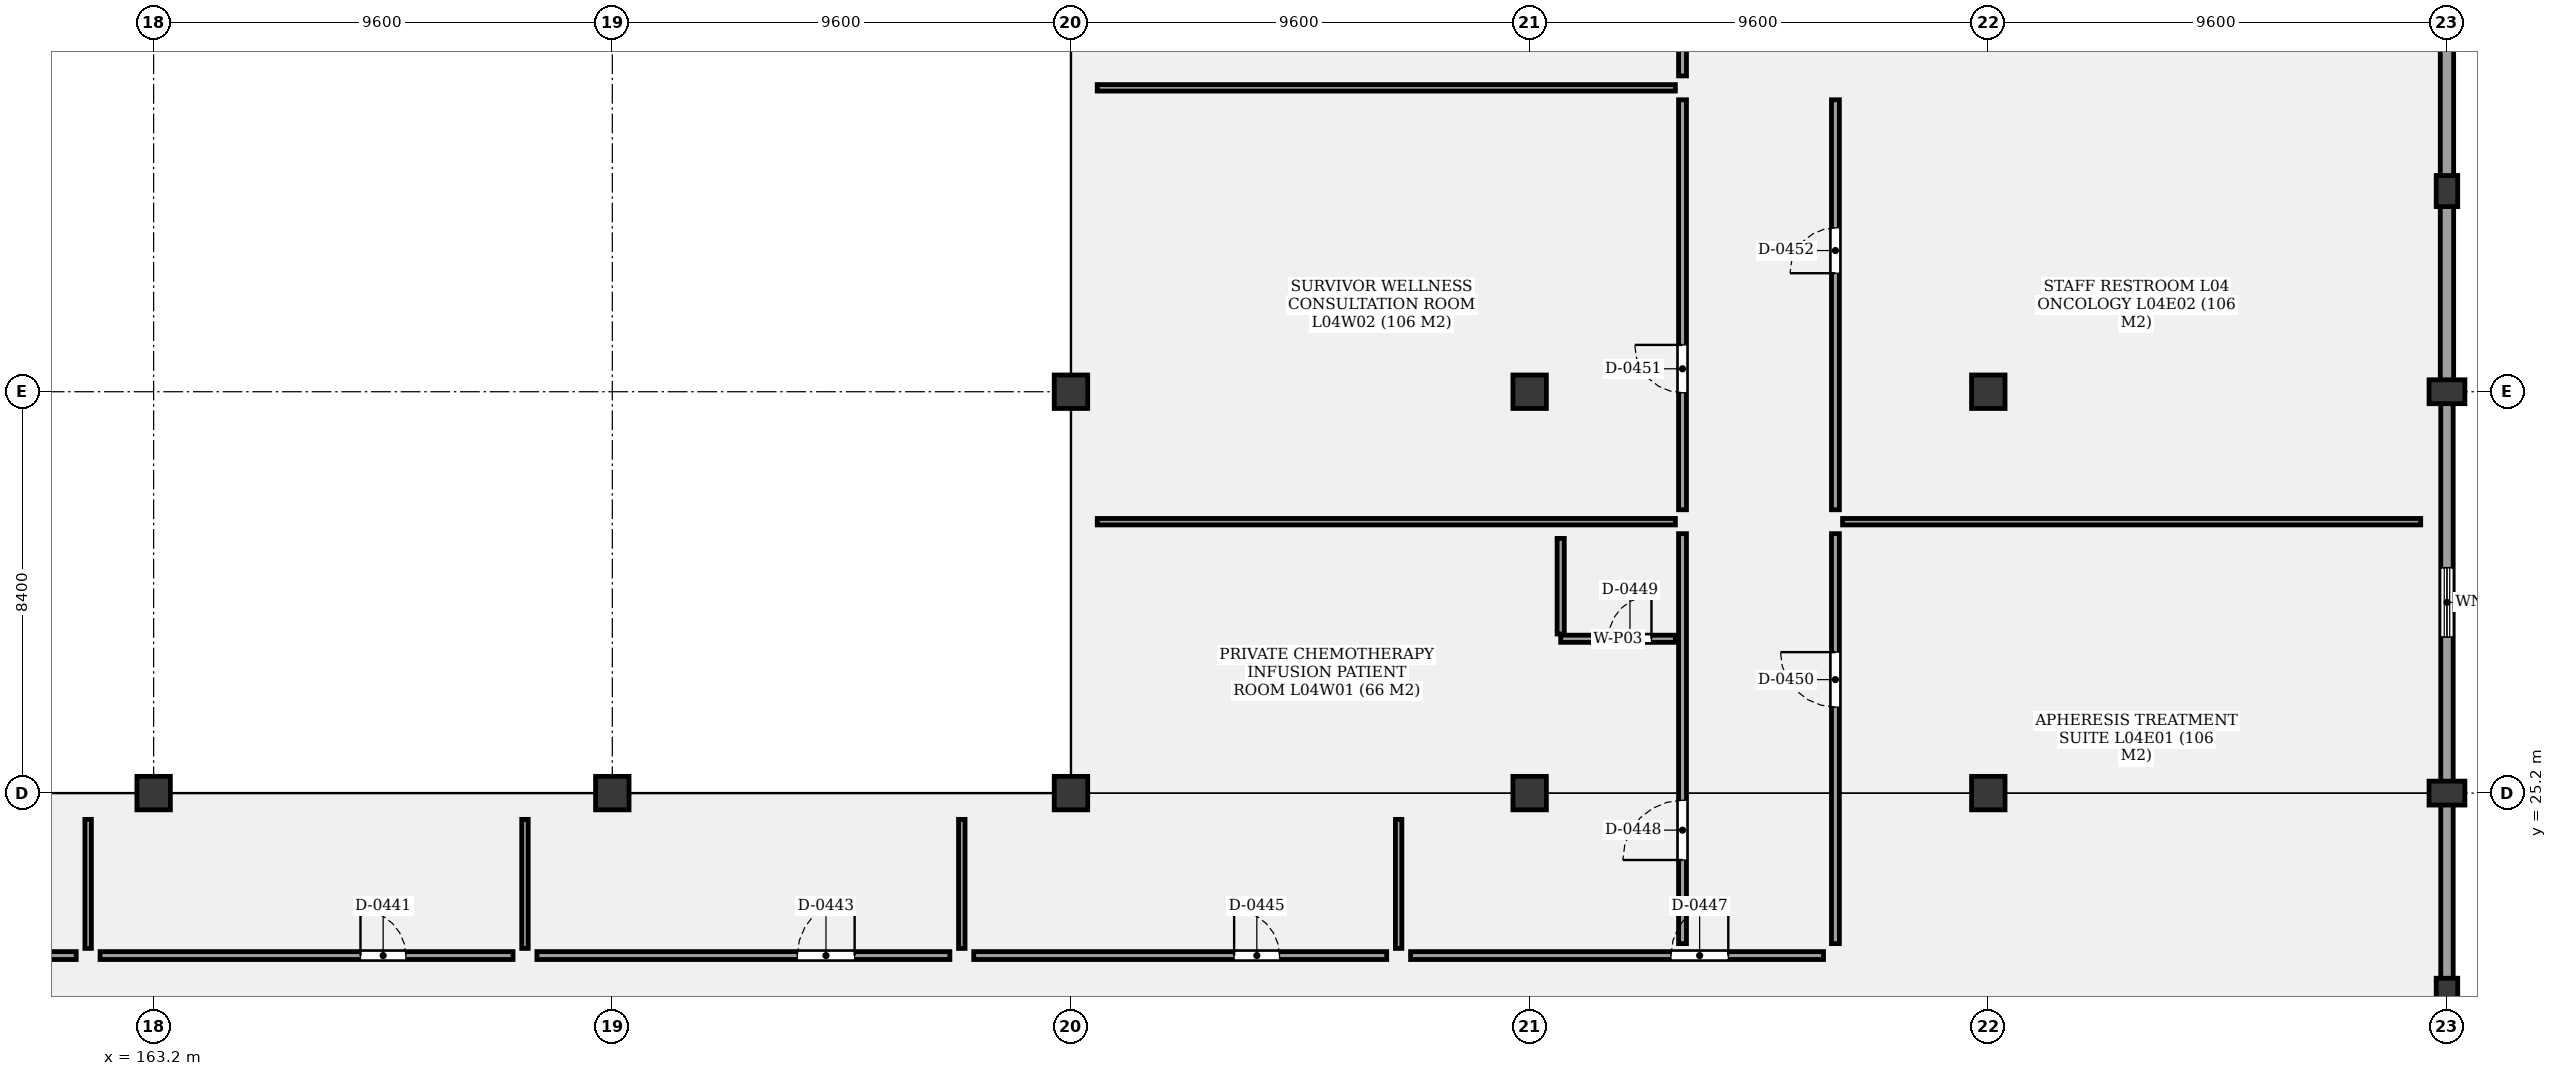
"""IFC4 building model, lengths in metres.
Left out: names, types, materials, properties, quantities, classifications, styles, units other than length and angle.
Written with IfcOpenShell. Run it as: python <this file> out.ifc"""

import sys

from ifc_helpers import new_model, si_unit, direction, frame, frame_2d, origin, origin_2d, place, context, subcontext, project, spatial, rectangle, extrude, element, fill, save


model = new_model("IFC4")
c1 = context("Model", 3, precision=1e-05, world=origin(), true_north=direction((0.0, 1.0)))
c2 = subcontext(c1, "Body", "Model", "MODEL_VIEW")
j1 = project(units=[si_unit("LENGTHUNIT", "METRE"), si_unit("PLANEANGLEUNIT", "RADIAN")], contexts=[c1])
p1 = place(None, origin())
s1 = spatial("IfcSite", under=j1, at=p1, CompositionType="ELEMENT")
p2 = place(p1, origin())
s2 = spatial("IfcBuilding", under=s1, at=p2, CompositionType="ELEMENT")
p3 = place(p2, frame((0.0, 0.0, 17.8)))
s3 = spatial("IfcBuildingStorey", under=s2, at=p3, CompositionType="ELEMENT", Elevation=17.8)
for number, where, z_axis, x_axis in (
    (1, (163.2, 25.2, 0.0), (0.0, 0.0, 1.0), (1.0, 0.0, 0.0)),
    (2, (172.8, 25.2, 0.0), (0.0, 0.0, 1.0), (1.0, 0.0, 0.0)),
    (3, (182.4, 25.2, 0.0), (0.0, 0.0, 1.0), (1.0, 0.0, 0.0)),
    (4, (182.4, 33.6, 0.0), (0.0, 0.0, 1.0), (1.0, 0.0, 0.0)),
    (5, (192.0, 25.2, 0.0), (0.0, 0.0, 1.0), (1.0, 0.0, 0.0)),
    (6, (192.0, 33.6, 0.0), (0.0, 0.0, 1.0), (1.0, 0.0, 0.0)),
    (7, (201.6, 25.2, 0.0), (0.0, 0.0, 1.0), (1.0, 0.0, 0.0)),
    (8, (201.6, 33.6, 0.0), (0.0, 0.0, 1.0), (1.0, 0.0, 0.0)),
):
    element("IfcColumn", number, at=place(p3, frame(where, z_axis=z_axis, x_axis=x_axis)), inside=s3, PredefinedType="COLUMN", context=c2, shape_type="SweptSolid", body=[
        extrude(rectangle(XDim=0.7, YDim=0.7, at=origin_2d()), origin(), (0.0, 0.0, 1.0), 4.2),
    ])
for number, where, z_axis, x_axis in (
    (9, (211.2, 25.2, 0.0), (0.0, 0.0, 1.0), (1.0, 0.0, 0.0)),
    (10, (211.2, 33.6, 0.0), (0.0, 0.0, 1.0), (1.0, 0.0, 0.0)),
):
    element("IfcColumn", number, at=place(p3, frame(where, z_axis=z_axis, x_axis=x_axis)), inside=s3, PredefinedType="COLUMN", context=c2, shape_type="SweptSolid", body=[
        extrude(rectangle(XDim=0.75, YDim=0.5, at=origin_2d()), origin(), (0.0, 0.0, 1.0), 4.2),
    ])
for number, where, z_axis, x_axis in (
    (11, (211.2, 21.0, 0.0), (0.0, 0.0, 1.0), (1.0, 0.0, 0.0)),
    (12, (211.2, 37.8, 0.0), (0.0, 0.0, 1.0), (1.0, 0.0, 0.0)),
):
    element("IfcColumn", number, at=place(p3, frame(where, z_axis=z_axis, x_axis=x_axis)), inside=s3, PredefinedType="PILASTER", context=c2, shape_type="SweptSolid", body=[
        extrude(rectangle(XDim=0.45, YDim=0.65, at=origin_2d()), origin(), (0.0, 0.0, 1.0), 4.2),
    ])
p4 = place(p3, frame((211.2, 33.6, 0.0), z_axis=(0.0, 0.0, 1.0), x_axis=(0.0, -1.0, 0.0)))
e13 = element("IfcWall", 13, at=p4, inside=s3, PredefinedType="SOLIDWALL", context=c2, shape_type="SweptSolid", body=[
    extrude(rectangle(XDim=16.8, YDim=0.26, at=frame_2d((8.4, 0.0))), origin(), (0.0, 0.0, 1.0), 3.39),
])
p5 = place(p4, frame((3.684, 0.0, 0.85)))
e14 = element("IfcOpeningElement", 14, at=p5, cuts=e13, PredefinedType="OPENING", context=c2, shape_type="SweptSolid", body=[
    extrude(rectangle(XDim=1.45, YDim=1.6, at=frame_2d((0.725, 0.8))), frame((0.0, 0.14, 0.0), z_axis=(0.0, -1.0, 0.0), x_axis=(1.0, 0.0, 0.0)), (0.0, 0.0, 1.0), 0.28),
])
p6 = place(p3, frame((211.2, 67.04, 0.0), z_axis=(0.0, 0.0, 1.0), x_axis=(0.0, -1.0, 0.0)))
e15 = element("IfcWall", 15, at=p6, inside=s3, PredefinedType="SOLIDWALL", context=c2, shape_type="SweptSolid", body=[
    extrude(rectangle(XDim=33.44, YDim=0.28, at=frame_2d((16.72, 0.0))), origin(), (0.0, 0.0, 1.0), 3.39),
])
p7 = place(p6, frame((10.189, 0.0, 0.85)))
e16 = element("IfcOpeningElement", 16, at=p7, cuts=e15, PredefinedType="OPENING", context=c2, shape_type="SweptSolid", body=[
    extrude(rectangle(XDim=1.6, YDim=1.6, at=frame_2d((0.8, 0.8))), frame((0.0, 0.15, 0.0), z_axis=(0.0, -1.0, 0.0), x_axis=(1.0, 0.0, 0.0)), (0.0, 0.0, 1.0), 0.3),
])
p8 = place(p3, frame((152.936, 21.8, 0.0), z_axis=(0.0, 0.0, 1.0), x_axis=(1.0, 0.0, 0.0)))
e17 = element("IfcWall", 17, at=p8, inside=s3, PredefinedType="PARTITIONING", context=c2, shape_type="SweptSolid", body=[
    extrude(rectangle(XDim=8.643, YDim=0.165, at=frame_2d((4.322, 0.0))), origin(), (0.0, 0.0, 1.0), 3.3),
])
p9 = place(p8, frame((4.75, 0.0, 0.0)))
e18 = element("IfcOpeningElement", 18, at=p9, cuts=e17, PredefinedType="OPENING", context=c2, shape_type="SweptSolid", body=[
    extrude(rectangle(XDim=1.2, YDim=2.4, at=frame_2d((0.6, 1.2))), frame((0.0, 0.093, 0.0), z_axis=(0.0, -1.0, 0.0), x_axis=(1.0, 0.0, 0.0)), (0.0, 0.0, 1.0), 0.185),
])
p10 = place(p3, frame((162.079, 21.8, 0.0), z_axis=(0.0, 0.0, 1.0), x_axis=(1.0, 0.0, 0.0)))
e19 = element("IfcWall", 19, at=p10, inside=s3, PredefinedType="PARTITIONING", context=c2, shape_type="SweptSolid", body=[
    extrude(rectangle(XDim=8.643, YDim=0.165, at=frame_2d((4.321, 0.0))), origin(), (0.0, 0.0, 1.0), 3.3),
])
p11 = place(p10, frame((5.45, 0.0, 0.0)))
e20 = element("IfcOpeningElement", 20, at=p11, cuts=e19, PredefinedType="OPENING", context=c2, shape_type="SweptSolid", body=[
    extrude(rectangle(XDim=0.95, YDim=2.1, at=frame_2d((0.475, 1.05))), frame((0.0, 0.093, 0.0), z_axis=(0.0, -1.0, 0.0), x_axis=(1.0, 0.0, 0.0)), (0.0, 0.0, 1.0), 0.185),
])
p12 = place(p3, frame((161.829, 21.95, 0.0), z_axis=(0.0, 0.0, 1.0), x_axis=(0.0, 1.0, 0.0)))
e21 = element("IfcWall", 21, at=p12, inside=s3, PredefinedType="PARTITIONING", context=c2, shape_type="SweptSolid", body=[
    extrude(rectangle(XDim=2.7, YDim=0.135, at=frame_2d((1.35, 0.0))), origin(), (0.0, 0.0, 1.0), 3.3),
])
p13 = place(p3, frame((171.222, 21.8, 0.0), z_axis=(0.0, 0.0, 1.0), x_axis=(1.0, 0.0, 0.0)))
e22 = element("IfcWall", 22, at=p13, inside=s3, PredefinedType="PARTITIONING", context=c2, shape_type="SweptSolid", body=[
    extrude(rectangle(XDim=8.643, YDim=0.165, at=frame_2d((4.322, 0.0))), origin(), (0.0, 0.0, 1.0), 3.3),
])
p14 = place(p13, frame((5.45, 0.0, 0.0)))
e23 = element("IfcOpeningElement", 23, at=p14, cuts=e22, PredefinedType="OPENING", context=c2, shape_type="SweptSolid", body=[
    extrude(rectangle(XDim=1.2, YDim=2.4, at=frame_2d((0.6, 1.2))), frame((0.0, 0.093, 0.0), z_axis=(0.0, -1.0, 0.0), x_axis=(1.0, 0.0, 0.0)), (0.0, 0.0, 1.0), 0.185),
])
p15 = place(p3, frame((170.972, 21.95, 0.0), z_axis=(0.0, 0.0, 1.0), x_axis=(0.0, 1.0, 0.0)))
e24 = element("IfcWall", 24, at=p15, inside=s3, PredefinedType="PARTITIONING", context=c2, shape_type="SweptSolid", body=[
    extrude(rectangle(XDim=2.7, YDim=0.135, at=frame_2d((1.35, 0.0))), origin(), (0.0, 0.0, 1.0), 3.3),
])
p16 = place(p3, frame((180.365, 21.8, 0.0), z_axis=(0.0, 0.0, 1.0), x_axis=(1.0, 0.0, 0.0)))
e25 = element("IfcWall", 25, at=p16, inside=s3, PredefinedType="PARTITIONING", context=c2, shape_type="SweptSolid", body=[
    extrude(rectangle(XDim=8.643, YDim=0.165, at=frame_2d((4.322, 0.0))), origin(), (0.0, 0.0, 1.0), 3.3),
])
p17 = place(p16, frame((5.45, 0.0, 0.0)))
e26 = element("IfcOpeningElement", 26, at=p17, cuts=e25, PredefinedType="OPENING", context=c2, shape_type="SweptSolid", body=[
    extrude(rectangle(XDim=0.95, YDim=2.1, at=frame_2d((0.475, 1.05))), frame((0.0, 0.093, 0.0), z_axis=(0.0, -1.0, 0.0), x_axis=(1.0, 0.0, 0.0)), (0.0, 0.0, 1.0), 0.185),
])
p18 = place(p3, frame((180.115, 21.95, 0.0), z_axis=(0.0, 0.0, 1.0), x_axis=(0.0, 1.0, 0.0)))
e27 = element("IfcWall", 27, at=p18, inside=s3, PredefinedType="PARTITIONING", context=c2, shape_type="SweptSolid", body=[
    extrude(rectangle(XDim=2.7, YDim=0.135, at=frame_2d((1.35, 0.0))), origin(), (0.0, 0.0, 1.0), 3.3),
])
p19 = place(p3, frame((189.508, 21.8, 0.0), z_axis=(0.0, 0.0, 1.0), x_axis=(1.0, 0.0, 0.0)))
e28 = element("IfcWall", 28, at=p19, inside=s3, PredefinedType="PARTITIONING", context=c2, shape_type="SweptSolid", body=[
    extrude(rectangle(XDim=8.643, YDim=0.165, at=frame_2d((4.321, 0.0))), origin(), (0.0, 0.0, 1.0), 3.3),
])
p20 = place(p19, frame((5.45, 0.0, 0.0)))
e29 = element("IfcOpeningElement", 29, at=p20, cuts=e28, PredefinedType="OPENING", context=c2, shape_type="SweptSolid", body=[
    extrude(rectangle(XDim=1.2, YDim=2.4, at=frame_2d((0.6, 1.2))), frame((0.0, 0.093, 0.0), z_axis=(0.0, -1.0, 0.0), x_axis=(1.0, 0.0, 0.0)), (0.0, 0.0, 1.0), 0.185),
])
p21 = place(p3, frame((189.258, 21.95, 0.0), z_axis=(0.0, 0.0, 1.0), x_axis=(0.0, 1.0, 0.0)))
e30 = element("IfcWall", 30, at=p21, inside=s3, PredefinedType="PARTITIONING", context=c2, shape_type="SweptSolid", body=[
    extrude(rectangle(XDim=2.7, YDim=0.135, at=frame_2d((1.35, 0.0))), origin(), (0.0, 0.0, 1.0), 3.3),
])
p22 = place(p3, frame((195.2, 22.05, 0.0), z_axis=(0.0, 0.0, 1.0), x_axis=(0.0, 1.0, 0.0)))
e31 = element("IfcWall", 31, at=p22, inside=s3, PredefinedType="PARTITIONING", context=c2, shape_type="SweptSolid", body=[
    extrude(rectangle(XDim=8.58, YDim=0.165, at=frame_2d((4.29, 0.0))), origin(), (0.0, 0.0, 1.0), 3.3),
])
p23 = place(p22, frame((1.75, 0.0, 0.0)))
e32 = element("IfcOpeningElement", 32, at=p23, cuts=e31, PredefinedType="OPENING", context=c2, shape_type="SweptSolid", body=[
    extrude(rectangle(XDim=1.25, YDim=2.2, at=frame_2d((0.625, 1.1))), frame((0.0, 0.093, 0.0), z_axis=(0.0, -1.0, 0.0), x_axis=(1.0, 0.0, 0.0)), (0.0, 0.0, 1.0), 0.185),
])
p24 = place(p3, frame((192.65, 28.43, 0.0), z_axis=(0.0, 0.0, 1.0), x_axis=(1.0, 0.0, 0.0)))
e33 = element("IfcWall", 33, at=p24, inside=s3, PredefinedType="PARTITIONING", context=c2, shape_type="SweptSolid", body=[
    extrude(rectangle(XDim=2.4, YDim=0.15, at=frame_2d((1.2, 0.0))), origin(), (0.0, 0.0, 1.0), 3.3),
])
p25 = place(p24, frame((1.0, 0.0, 0.0)))
e34 = element("IfcOpeningElement", 34, at=p25, cuts=e33, PredefinedType="OPENING", context=c2, shape_type="SweptSolid", body=[
    extrude(rectangle(XDim=0.9, YDim=2.1, at=frame_2d((0.45, 1.05))), frame((0.0, 0.085, 0.0), z_axis=(0.0, -1.0, 0.0), x_axis=(1.0, 0.0, 0.0)), (0.0, 0.0, 1.0), 0.17),
])
p26 = place(p3, frame((192.65, 28.53, 0.0), z_axis=(0.0, 0.0, 1.0), x_axis=(0.0, 1.0, 0.0)))
e35 = element("IfcWall", 35, at=p26, inside=s3, PredefinedType="PARTITIONING", context=c2, shape_type="SweptSolid", body=[
    extrude(rectangle(XDim=2.0, YDim=0.15, at=frame_2d((1.0, 0.0))), origin(), (0.0, 0.0, 1.0), 3.3),
])
p27 = place(p3, frame((198.4, 22.05, 0.0), z_axis=(0.0, 0.0, 1.0), x_axis=(0.0, 1.0, 0.0)))
e36 = element("IfcWall", 36, at=p27, inside=s3, PredefinedType="PARTITIONING", context=c2, shape_type="SweptSolid", body=[
    extrude(rectangle(XDim=8.58, YDim=0.165, at=frame_2d((4.29, 0.0))), origin(), (0.0, 0.0, 1.0), 3.3),
])
p28 = place(p27, frame((4.95, 0.0, 0.0)))
e37 = element("IfcOpeningElement", 37, at=p28, cuts=e36, PredefinedType="OPENING", context=c2, shape_type="SweptSolid", body=[
    extrude(rectangle(XDim=1.15, YDim=2.2, at=frame_2d((0.575, 1.1))), frame((0.0, 0.093, 0.0), z_axis=(0.0, -1.0, 0.0), x_axis=(1.0, 0.0, 0.0)), (0.0, 0.0, 1.0), 0.185),
])
p29 = place(p3, frame((195.2, 31.13, 0.0), z_axis=(0.0, 0.0, 1.0), x_axis=(0.0, 1.0, 0.0)))
e38 = element("IfcWall", 38, at=p29, inside=s3, PredefinedType="PARTITIONING", context=c2, shape_type="SweptSolid", body=[
    extrude(rectangle(XDim=8.58, YDim=0.165, at=frame_2d((4.29, 0.0))), origin(), (0.0, 0.0, 1.0), 3.3),
])
p30 = place(p29, frame((2.45, 0.0, 0.0)))
e39 = element("IfcOpeningElement", 39, at=p30, cuts=e38, PredefinedType="OPENING", context=c2, shape_type="SweptSolid", body=[
    extrude(rectangle(XDim=1.0, YDim=2.2, at=frame_2d((0.5, 1.1))), frame((0.0, 0.093, 0.0), z_axis=(0.0, -1.0, 0.0), x_axis=(1.0, 0.0, 0.0)), (0.0, 0.0, 1.0), 0.185),
])
p31 = place(p3, frame((182.95, 30.88, 0.0), z_axis=(0.0, 0.0, 1.0), x_axis=(1.0, 0.0, 0.0)))
e40 = element("IfcWall", 40, at=p31, inside=s3, PredefinedType="PARTITIONING", context=c2, shape_type="SweptSolid", body=[
    extrude(rectangle(XDim=12.1, YDim=0.135, at=frame_2d((6.05, 0.0))), origin(), (0.0, 0.0, 1.0), 3.3),
])
p32 = place(p3, frame((198.4, 31.13, 0.0), z_axis=(0.0, 0.0, 1.0), x_axis=(0.0, 1.0, 0.0)))
e41 = element("IfcWall", 41, at=p32, inside=s3, PredefinedType="PARTITIONING", context=c2, shape_type="SweptSolid", body=[
    extrude(rectangle(XDim=8.58, YDim=0.165, at=frame_2d((4.29, 0.0))), origin(), (0.0, 0.0, 1.0), 3.3),
])
p33 = place(p32, frame((4.95, 0.0, 0.0)))
e42 = element("IfcOpeningElement", 42, at=p33, cuts=e41, PredefinedType="OPENING", context=c2, shape_type="SweptSolid", body=[
    extrude(rectangle(XDim=0.95, YDim=2.1, at=frame_2d((0.475, 1.05))), frame((0.0, 0.093, 0.0), z_axis=(0.0, -1.0, 0.0), x_axis=(1.0, 0.0, 0.0)), (0.0, 0.0, 1.0), 0.185),
])
p34 = place(p3, frame((198.55, 30.88, 0.0), z_axis=(0.0, 0.0, 1.0), x_axis=(1.0, 0.0, 0.0)))
e43 = element("IfcWall", 43, at=p34, inside=s3, PredefinedType="PARTITIONING", context=c2, shape_type="SweptSolid", body=[
    extrude(rectangle(XDim=12.1, YDim=0.135, at=frame_2d((6.05, 0.0))), origin(), (0.0, 0.0, 1.0), 3.3),
])
p35 = place(p3, frame((195.2, 40.21, 0.0), z_axis=(0.0, 0.0, 1.0), x_axis=(0.0, 1.0, 0.0)))
e44 = element("IfcWall", 44, at=p35, inside=s3, PredefinedType="PARTITIONING", context=c2, shape_type="SweptSolid", body=[
    extrude(rectangle(XDim=8.58, YDim=0.165, at=frame_2d((4.29, 0.0))), origin(), (0.0, 0.0, 1.0), 3.3),
])
p36 = place(p35, frame((2.45, 0.0, 0.0)))
e45 = element("IfcOpeningElement", 45, at=p36, cuts=e44, PredefinedType="OPENING", context=c2, shape_type="SweptSolid", body=[
    extrude(rectangle(XDim=1.25, YDim=2.2, at=frame_2d((0.625, 1.1))), frame((0.0, 0.093, 0.0), z_axis=(0.0, -1.0, 0.0), x_axis=(1.0, 0.0, 0.0)), (0.0, 0.0, 1.0), 0.185),
])
p37 = place(p3, frame((182.95, 39.96, 0.0), z_axis=(0.0, 0.0, 1.0), x_axis=(1.0, 0.0, 0.0)))
e46 = element("IfcWall", 46, at=p37, inside=s3, PredefinedType="PARTITIONING", context=c2, shape_type="SweptSolid", body=[
    extrude(rectangle(XDim=12.1, YDim=0.135, at=frame_2d((6.05, 0.0))), origin(), (0.0, 0.0, 1.0), 3.3),
])
p38 = place(p5, origin())
e47 = element("IfcWindow", 47, at=p38, inside=s3, PartitioningType="SINGLE_PANEL", PredefinedType="WINDOW", context=c2, shape_type="SweptSolid", body=[
    extrude(rectangle(XDim=1.45, YDim=1.6, at=frame_2d((0.725, 0.8))), frame((0.0, 0.03, 0.0), z_axis=(0.0, -1.0, 0.0), x_axis=(1.0, 0.0, 0.0)), (0.0, 0.0, 1.0), 0.06),
])
fill(e14, e47)
p39 = place(p11, origin())
e48 = element("IfcDoor", 48, at=p39, inside=s3, OperationType="SINGLE_SWING_LEFT", PredefinedType="DOOR", context=c2, shape_type="SweptSolid", body=[
    extrude(rectangle(XDim=0.95, YDim=2.1, at=frame_2d((0.475, 1.05))), frame((0.0, 0.025, 0.0), z_axis=(0.0, -1.0, 0.0), x_axis=(1.0, 0.0, 0.0)), (0.0, 0.0, 1.0), 0.05),
])
fill(e20, e48)
p40 = place(p14, origin())
e49 = element("IfcDoor", 49, at=p40, inside=s3, OperationType="SINGLE_SWING_RIGHT", PredefinedType="DOOR", context=c2, shape_type="SweptSolid", body=[
    extrude(rectangle(XDim=1.2, YDim=2.4, at=frame_2d((0.6, 1.2))), frame((0.0, 0.025, 0.0), z_axis=(0.0, -1.0, 0.0), x_axis=(1.0, 0.0, 0.0)), (0.0, 0.0, 1.0), 0.05),
])
fill(e23, e49)
p41 = place(p17, origin())
e50 = element("IfcDoor", 50, at=p41, inside=s3, OperationType="SINGLE_SWING_LEFT", PredefinedType="DOOR", context=c2, shape_type="SweptSolid", body=[
    extrude(rectangle(XDim=0.95, YDim=2.1, at=frame_2d((0.475, 1.05))), frame((0.0, 0.025, 0.0), z_axis=(0.0, -1.0, 0.0), x_axis=(1.0, 0.0, 0.0)), (0.0, 0.0, 1.0), 0.05),
])
fill(e26, e50)
p42 = place(p20, origin())
e51 = element("IfcDoor", 51, at=p42, inside=s3, OperationType="SINGLE_SWING_RIGHT", PredefinedType="DOOR", context=c2, shape_type="SweptSolid", body=[
    extrude(rectangle(XDim=1.2, YDim=2.4, at=frame_2d((0.6, 1.2))), frame((0.0, 0.025, 0.0), z_axis=(0.0, -1.0, 0.0), x_axis=(1.0, 0.0, 0.0)), (0.0, 0.0, 1.0), 0.05),
])
fill(e29, e51)
p43 = place(p23, origin())
e52 = element("IfcDoor", 52, at=p43, inside=s3, OperationType="SINGLE_SWING_LEFT", PredefinedType="DOOR", context=c2, shape_type="SweptSolid", body=[
    extrude(rectangle(XDim=1.25, YDim=2.2, at=frame_2d((0.625, 1.1))), frame((0.0, 0.025, 0.0), z_axis=(0.0, -1.0, 0.0), x_axis=(1.0, 0.0, 0.0)), (0.0, 0.0, 1.0), 0.05),
])
fill(e32, e52)
p44 = place(p25, origin())
e53 = element("IfcDoor", 53, at=p44, inside=s3, OperationType="SINGLE_SWING_RIGHT", PredefinedType="DOOR", context=c2, shape_type="SweptSolid", body=[
    extrude(rectangle(XDim=0.9, YDim=2.1, at=frame_2d((0.45, 1.05))), frame((0.0, 0.025, 0.0), z_axis=(0.0, -1.0, 0.0), x_axis=(1.0, 0.0, 0.0)), (0.0, 0.0, 1.0), 0.05),
])
fill(e34, e53)
p45 = place(p28, origin())
e54 = element("IfcDoor", 54, at=p45, inside=s3, OperationType="SINGLE_SWING_RIGHT", PredefinedType="DOOR", context=c2, shape_type="SweptSolid", body=[
    extrude(rectangle(XDim=1.15, YDim=2.2, at=frame_2d((0.575, 1.1))), frame((0.0, 0.025, 0.0), z_axis=(0.0, -1.0, 0.0), x_axis=(1.0, 0.0, 0.0)), (0.0, 0.0, 1.0), 0.05),
])
fill(e37, e54)
p46 = place(p30, origin())
e55 = element("IfcDoor", 55, at=p46, inside=s3, OperationType="SINGLE_SWING_RIGHT", PredefinedType="DOOR", context=c2, shape_type="SweptSolid", body=[
    extrude(rectangle(XDim=1.0, YDim=2.2, at=frame_2d((0.5, 1.1))), frame((0.0, 0.025, 0.0), z_axis=(0.0, -1.0, 0.0), x_axis=(1.0, 0.0, 0.0)), (0.0, 0.0, 1.0), 0.05),
])
fill(e39, e55)
p47 = place(p33, origin())
e56 = element("IfcDoor", 56, at=p47, inside=s3, OperationType="SINGLE_SWING_LEFT", PredefinedType="DOOR", context=c2, shape_type="SweptSolid", body=[
    extrude(rectangle(XDim=0.95, YDim=2.1, at=frame_2d((0.475, 1.05))), frame((0.0, 0.025, 0.0), z_axis=(0.0, -1.0, 0.0), x_axis=(1.0, 0.0, 0.0)), (0.0, 0.0, 1.0), 0.05),
])
fill(e42, e56)
save(model, sys.argv[1])
